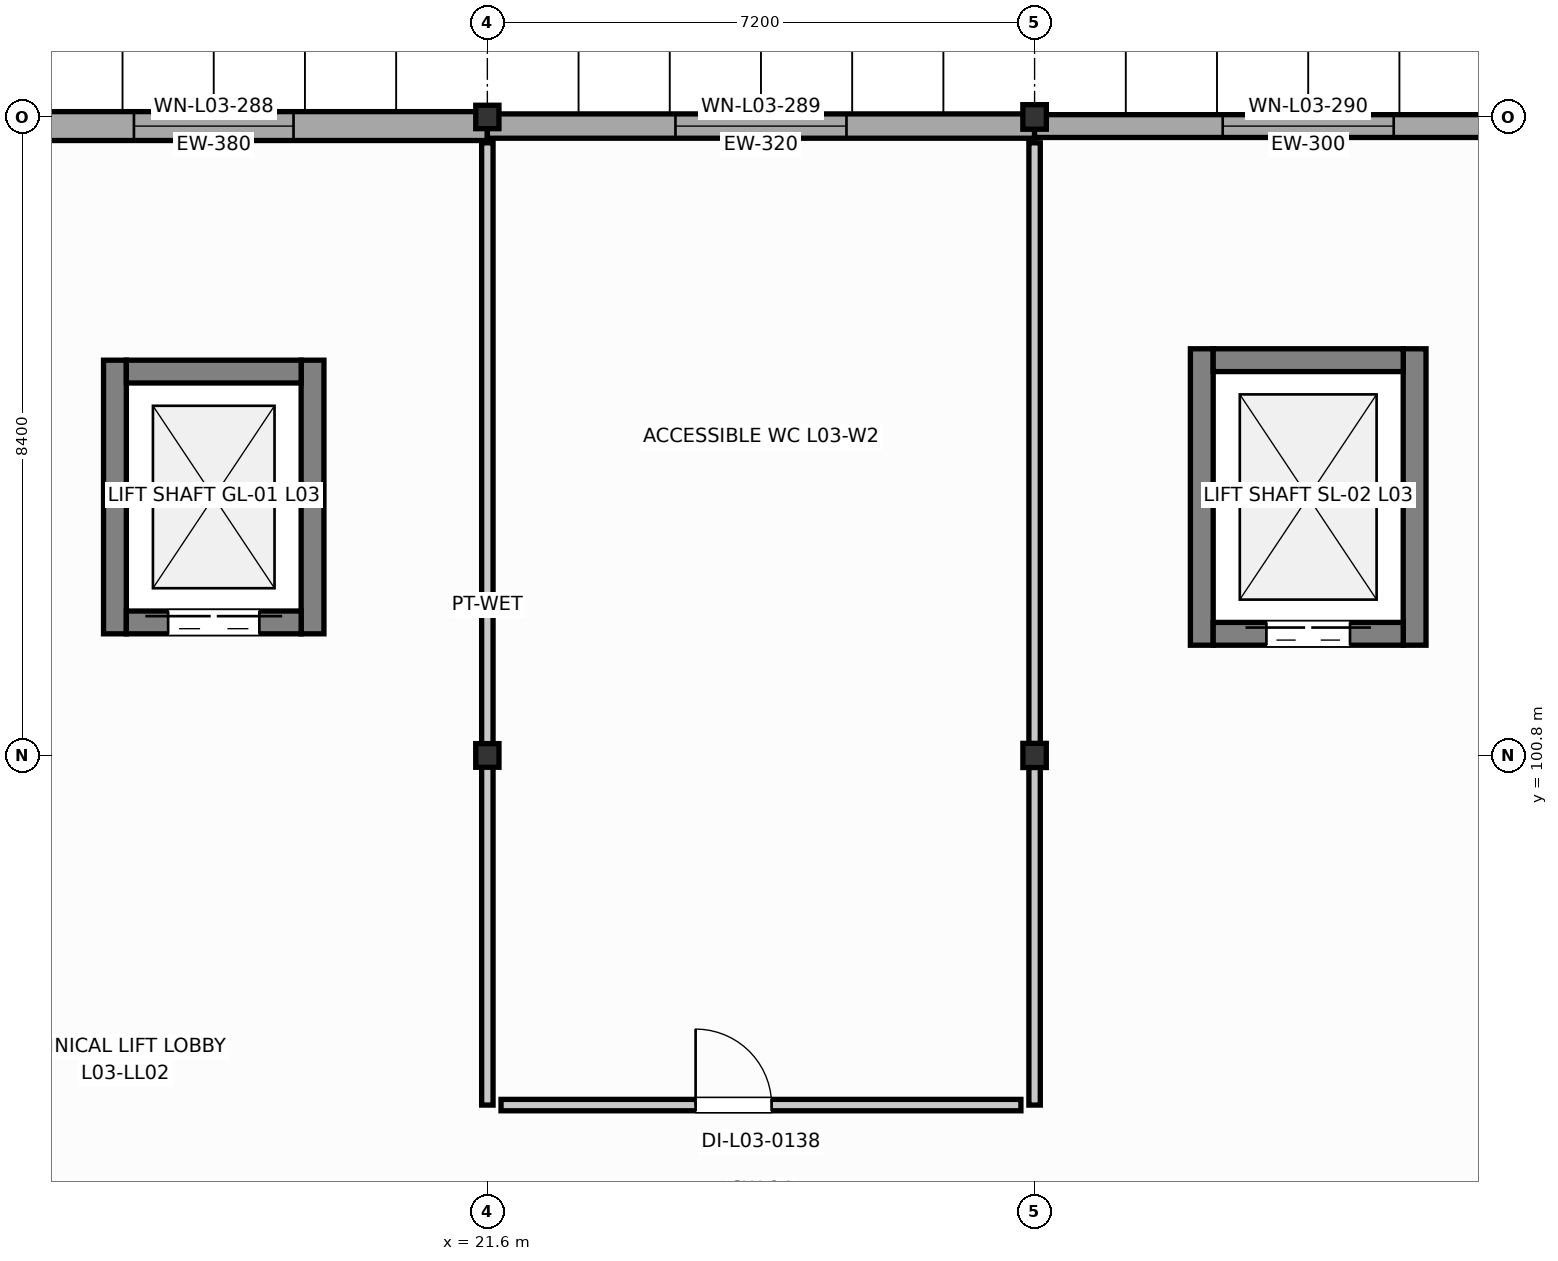
"""IFC4 building model, lengths in metres.
Left out: names, types, materials, properties, quantities, classifications, styles, units other than length and angle.
Written with IfcOpenShell. Run it as: python <this file> out.ifc"""

import sys

from ifc_helpers import new_model, si_unit, direction, frame, frame_2d, origin, origin_2d, place, context, subcontext, project, spatial, rectangle, i_section, extrude, element, fill, save


model = new_model("IFC4")
c1 = context("Model", 3, precision=1e-05, world=origin(), true_north=direction((0.0, 1.0)))
c2 = subcontext(c1, "Body", "Model", "MODEL_VIEW")
j1 = project(units=[si_unit("LENGTHUNIT", "METRE"), si_unit("PLANEANGLEUNIT", "RADIAN")], contexts=[c1])
p1 = place(None, origin())
s1 = spatial("IfcSite", under=j1, at=p1, CompositionType="ELEMENT")
p2 = place(p1, origin())
s2 = spatial("IfcBuilding", under=s1, at=p2, CompositionType="ELEMENT")
p3 = place(p2, frame((0.0, 0.0, 13.2)))
s3 = spatial("IfcBuildingStorey", under=s2, at=p3, CompositionType="ELEMENT", Elevation=13.2)
p4 = place(p3, frame((21.6, 100.8, 0.0), z_axis=(0.0, 0.0, 1.0), x_axis=(1.0, 0.0, 0.0)))
e1 = element("IfcColumn", 1, at=p4, inside=s3, PredefinedType="COLUMN", context=c2, shape_type="SweptSolid", body=[
    extrude(i_section(OverallWidth=0.306, OverallDepth=0.311, WebThickness=0.011, FlangeThickness=0.017, FilletRadius=0.015, at=origin_2d()), origin(), (0.0, 0.0, 1.0), 4.2),
])
p5 = place(p3, frame((21.6, 109.2, 0.0), z_axis=(0.0, 0.0, 1.0), x_axis=(1.0, 0.0, 0.0)))
e2 = element("IfcColumn", 2, at=p5, inside=s3, PredefinedType="COLUMN", context=c2, shape_type="SweptSolid", body=[
    extrude(i_section(OverallWidth=0.305, OverallDepth=0.308, WebThickness=0.01, FlangeThickness=0.015, FilletRadius=0.015, at=origin_2d()), origin(), (0.0, 0.0, 1.0), 4.2),
])
p6 = place(p3, frame((28.8, 100.8, 0.0), z_axis=(0.0, 0.0, 1.0), x_axis=(1.0, 0.0, 0.0)))
e3 = element("IfcColumn", 3, at=p6, inside=s3, PredefinedType="COLUMN", context=c2, shape_type="SweptSolid", body=[
    extrude(i_section(OverallWidth=0.308, OverallDepth=0.318, WebThickness=0.013, FlangeThickness=0.021, FilletRadius=0.016, at=origin_2d()), origin(), (0.0, 0.0, 1.0), 4.2),
])
p7 = place(p3, frame((28.8, 109.2, 0.0), z_axis=(0.0, 0.0, 1.0), x_axis=(1.0, 0.0, 0.0)))
e4 = element("IfcColumn", 4, at=p7, inside=s3, PredefinedType="COLUMN", context=c2, shape_type="SweptSolid", body=[
    extrude(i_section(OverallWidth=0.309, OverallDepth=0.323, WebThickness=0.014, FlangeThickness=0.023, FilletRadius=0.016, at=origin_2d()), origin(), (0.0, 0.0, 1.0), 4.2),
])
for number, where, z_axis, x_axis in (
    (5, (31.0, 102.25, 0.0), (0.0, 0.0, 1.0), (0.0, 1.0, 0.0)),
    (6, (33.8, 102.25, 0.0), (0.0, 0.0, 1.0), (0.0, 1.0, 0.0)),
):
    element("IfcWall", number, at=place(p3, frame(where, z_axis=z_axis, x_axis=x_axis)), inside=s3, PredefinedType="SHEAR", context=c2, shape_type="SweptSolid", body=[
        extrude(rectangle(XDim=3.9, YDim=0.3, at=frame_2d((1.95, 0.0))), origin(), (0.0, 0.0, 1.0), 3.99),
    ])
p8 = place(p3, frame((31.15, 106.0, 0.0), z_axis=(0.0, 0.0, 1.0), x_axis=(1.0, 0.0, 0.0)))
e7 = element("IfcWall", 7, at=p8, inside=s3, PredefinedType="SHEAR", context=c2, shape_type="SweptSolid", body=[
    extrude(rectangle(XDim=2.5, YDim=0.3, at=frame_2d((1.25, 0.0))), origin(), (0.0, 0.0, 1.0), 3.99),
])
p9 = place(p3, frame((31.15, 102.4, 0.0), z_axis=(0.0, 0.0, 1.0), x_axis=(1.0, 0.0, 0.0)))
e8 = element("IfcWall", 8, at=p9, inside=s3, PredefinedType="SHEAR", context=c2, shape_type="SweptSolid", body=[
    extrude(rectangle(XDim=2.5, YDim=0.3, at=frame_2d((1.25, 0.0))), origin(), (0.0, 0.0, 1.0), 3.99),
])
p10 = place(p9, frame((0.7, 0.0, 0.0)))
e9 = element("IfcOpeningElement", 9, at=p10, cuts=e8, PredefinedType="OPENING", context=c2, shape_type="SweptSolid", body=[
    extrude(rectangle(XDim=1.1, YDim=2.15, at=frame_2d((0.55, 1.075))), frame((0.0, 0.16, 0.0), z_axis=(0.0, -1.0, 0.0), x_axis=(1.0, 0.0, 0.0)), (0.0, 0.0, 1.0), 0.32),
])
for number, where, z_axis, x_axis in (
    (10, (16.7, 102.4, 0.0), (0.0, 0.0, 1.0), (0.0, 1.0, 0.0)),
    (11, (19.3, 102.4, 0.0), (0.0, 0.0, 1.0), (0.0, 1.0, 0.0)),
):
    element("IfcWall", number, at=place(p3, frame(where, z_axis=z_axis, x_axis=x_axis)), inside=s3, PredefinedType="SHEAR", context=c2, shape_type="SweptSolid", body=[
        extrude(rectangle(XDim=3.6, YDim=0.3, at=frame_2d((1.8, 0.0))), origin(), (0.0, 0.0, 1.0), 3.99),
    ])
p11 = place(p3, frame((16.85, 105.85, 0.0), z_axis=(0.0, 0.0, 1.0), x_axis=(1.0, 0.0, 0.0)))
e12 = element("IfcWall", 12, at=p11, inside=s3, PredefinedType="SHEAR", context=c2, shape_type="SweptSolid", body=[
    extrude(rectangle(XDim=2.3, YDim=0.3, at=frame_2d((1.15, 0.0))), origin(), (0.0, 0.0, 1.0), 3.99),
])
p12 = place(p3, frame((16.85, 102.55, 0.0), z_axis=(0.0, 0.0, 1.0), x_axis=(1.0, 0.0, 0.0)))
e13 = element("IfcWall", 13, at=p12, inside=s3, PredefinedType="SHEAR", context=c2, shape_type="SweptSolid", body=[
    extrude(rectangle(XDim=2.3, YDim=0.3, at=frame_2d((1.15, 0.0))), origin(), (0.0, 0.0, 1.0), 3.99),
])
p13 = place(p12, frame((0.55, 0.0, 0.0)))
e14 = element("IfcOpeningElement", 14, at=p13, cuts=e13, PredefinedType="OPENING", context=c2, shape_type="SweptSolid", body=[
    extrude(rectangle(XDim=1.2, YDim=2.15, at=frame_2d((0.6, 1.075))), frame((0.0, 0.16, 0.0), z_axis=(0.0, -1.0, 0.0), x_axis=(1.0, 0.0, 0.0)), (0.0, 0.0, 1.0), 0.32),
])
p14 = place(p3, frame((14.4, 109.08, 0.0), z_axis=(0.0, 0.0, 1.0), x_axis=(1.0, 0.0, 0.0)))
e15 = element("IfcWall", 15, at=p14, inside=s3, PredefinedType="SOLIDWALL", context=c2, shape_type="SweptSolid", body=[
    extrude(rectangle(XDim=7.2, YDim=0.38, at=frame_2d((3.6, 0.0))), origin(), (0.0, 0.0, 1.0), 3.482),
])
p15 = place(p14, frame((2.55, 0.0, 0.95)))
e16 = element("IfcOpeningElement", 16, at=p15, cuts=e15, PredefinedType="OPENING", context=c2, shape_type="SweptSolid", body=[
    extrude(rectangle(XDim=2.1, YDim=1.75, at=frame_2d((1.05, 0.875))), frame((0.0, 0.2, 0.0), z_axis=(0.0, -1.0, 0.0), x_axis=(1.0, 0.0, 0.0)), (0.0, 0.0, 1.0), 0.4),
])
p16 = place(p3, frame((21.6, 109.08, 0.0), z_axis=(0.0, 0.0, 1.0), x_axis=(1.0, 0.0, 0.0)))
e17 = element("IfcWall", 17, at=p16, inside=s3, PredefinedType="SOLIDWALL", context=c2, shape_type="SweptSolid", body=[
    extrude(rectangle(XDim=7.2, YDim=0.32, at=frame_2d((3.6, 0.0))), origin(), (0.0, 0.0, 1.0), 3.482),
])
p17 = place(p16, frame((2.475, 0.0, 0.95)))
e18 = element("IfcOpeningElement", 18, at=p17, cuts=e17, PredefinedType="OPENING", context=c2, shape_type="SweptSolid", body=[
    extrude(rectangle(XDim=2.25, YDim=1.15, at=frame_2d((1.125, 0.575))), frame((0.0, 0.17, 0.0), z_axis=(0.0, -1.0, 0.0), x_axis=(1.0, 0.0, 0.0)), (0.0, 0.0, 1.0), 0.34),
])
p18 = place(p3, frame((28.8, 109.08, 0.0), z_axis=(0.0, 0.0, 1.0), x_axis=(1.0, 0.0, 0.0)))
e19 = element("IfcWall", 19, at=p18, inside=s3, PredefinedType="SOLIDWALL", context=c2, shape_type="SweptSolid", body=[
    extrude(rectangle(XDim=7.2, YDim=0.3, at=frame_2d((3.6, 0.0))), origin(), (0.0, 0.0, 1.0), 3.482),
])
p19 = place(p18, frame((2.475, 0.0, 0.95)))
e20 = element("IfcOpeningElement", 20, at=p19, cuts=e19, PredefinedType="OPENING", context=c2, shape_type="SweptSolid", body=[
    extrude(rectangle(XDim=2.25, YDim=1.35, at=frame_2d((1.125, 0.675))), frame((0.0, 0.16, 0.0), z_axis=(0.0, -1.0, 0.0), x_axis=(1.0, 0.0, 0.0)), (0.0, 0.0, 1.0), 0.32),
])
p20 = place(p3, frame((21.6, 96.2, 0.0), z_axis=(0.0, 0.0, 1.0), x_axis=(0.0, 1.0, 0.0)))
e21 = element("IfcWall", 21, at=p20, inside=s3, PredefinedType="PLUMBINGWALL", context=c2, shape_type="SweptSolid", body=[
    extrude(rectangle(XDim=12.66, YDim=0.15, at=frame_2d((6.33, 0.0))), origin(), (0.0, 0.0, 1.0), 3.479),
])
p21 = place(p3, frame((28.8, 108.86, 0.0), z_axis=(0.0, 0.0, 1.0), x_axis=(0.0, -1.0, 0.0)))
e22 = element("IfcWall", 22, at=p21, inside=s3, PredefinedType="PLUMBINGWALL", context=c2, shape_type="SweptSolid", body=[
    extrude(rectangle(XDim=12.66, YDim=0.15, at=frame_2d((6.33, 0.0))), origin(), (0.0, 0.0, 1.0), 3.532),
])
p22 = place(p3, frame((28.62, 96.2, 0.0), z_axis=(0.0, 0.0, 1.0), x_axis=(-1.0, 0.0, 0.0)))
e23 = element("IfcWall", 23, at=p22, inside=s3, PredefinedType="PLUMBINGWALL", context=c2, shape_type="SweptSolid", body=[
    extrude(rectangle(XDim=6.84, YDim=0.15, at=frame_2d((3.42, 0.0))), origin(), (0.0, 0.0, 1.0), 3.945),
])
p23 = place(p22, frame((3.28, 0.0, 0.0)))
e24 = element("IfcOpeningElement", 24, at=p23, cuts=e23, PredefinedType="OPENING", context=c2, shape_type="SweptSolid", body=[
    extrude(rectangle(XDim=1.0, YDim=2.1, at=frame_2d((0.5, 1.05))), frame((0.0, 0.085, 0.0), z_axis=(0.0, -1.0, 0.0), x_axis=(1.0, 0.0, 0.0)), (0.0, 0.0, 1.0), 0.17),
])
p24 = place(p10, origin())
e25 = element("IfcDoor", 25, at=p24, inside=s3, OperationType="DOUBLE_DOOR_SLIDING", PredefinedType="DOOR", context=c2, shape_type="SweptSolid", body=[
    extrude(rectangle(XDim=1.1, YDim=2.15, at=frame_2d((0.55, 1.075))), frame((0.0, 0.025, 0.0), z_axis=(0.0, -1.0, 0.0), x_axis=(1.0, 0.0, 0.0)), (0.0, 0.0, 1.0), 0.05),
])
fill(e9, e25)
p25 = place(p13, origin())
e26 = element("IfcDoor", 26, at=p25, inside=s3, OperationType="DOUBLE_DOOR_SLIDING", PredefinedType="DOOR", context=c2, shape_type="SweptSolid", body=[
    extrude(rectangle(XDim=1.2, YDim=2.15, at=frame_2d((0.6, 1.075))), frame((0.0, 0.025, 0.0), z_axis=(0.0, -1.0, 0.0), x_axis=(1.0, 0.0, 0.0)), (0.0, 0.0, 1.0), 0.05),
])
fill(e14, e26)
p26 = place(p15, origin())
e27 = element("IfcWindow", 27, at=p26, inside=s3, PartitioningType="SINGLE_PANEL", PredefinedType="WINDOW", context=c2, shape_type="SweptSolid", body=[
    extrude(rectangle(XDim=2.1, YDim=1.75, at=frame_2d((1.05, 0.875))), frame((0.0, 0.03, 0.0), z_axis=(0.0, -1.0, 0.0), x_axis=(1.0, 0.0, 0.0)), (0.0, 0.0, 1.0), 0.06),
])
fill(e16, e27)
p27 = place(p17, origin())
e28 = element("IfcWindow", 28, at=p27, inside=s3, PartitioningType="SINGLE_PANEL", PredefinedType="WINDOW", context=c2, shape_type="SweptSolid", body=[
    extrude(rectangle(XDim=2.25, YDim=1.15, at=frame_2d((1.125, 0.575))), frame((0.0, 0.03, 0.0), z_axis=(0.0, -1.0, 0.0), x_axis=(1.0, 0.0, 0.0)), (0.0, 0.0, 1.0), 0.06),
])
fill(e18, e28)
p28 = place(p19, origin())
e29 = element("IfcWindow", 29, at=p28, inside=s3, PartitioningType="SINGLE_PANEL", PredefinedType="WINDOW", context=c2, shape_type="SweptSolid", body=[
    extrude(rectangle(XDim=2.25, YDim=1.35, at=frame_2d((1.125, 0.675))), frame((0.0, 0.03, 0.0), z_axis=(0.0, -1.0, 0.0), x_axis=(1.0, 0.0, 0.0)), (0.0, 0.0, 1.0), 0.06),
])
fill(e20, e29)
p29 = place(p23, frame((1.0, 0.0, 0.0), z_axis=(0.0, 0.0, 1.0), x_axis=(-1.0, 0.0, 0.0)))
e30 = element("IfcDoor", 30, at=p29, inside=s3, OperationType="SINGLE_SWING_LEFT", PredefinedType="DOOR", context=c2, shape_type="SweptSolid", body=[
    extrude(rectangle(XDim=1.0, YDim=2.1, at=frame_2d((0.5, 1.05))), frame((0.0, 0.025, 0.0), z_axis=(0.0, -1.0, 0.0), x_axis=(1.0, 0.0, 0.0)), (0.0, 0.0, 1.0), 0.05),
])
fill(e24, e30)
save(model, sys.argv[1])
